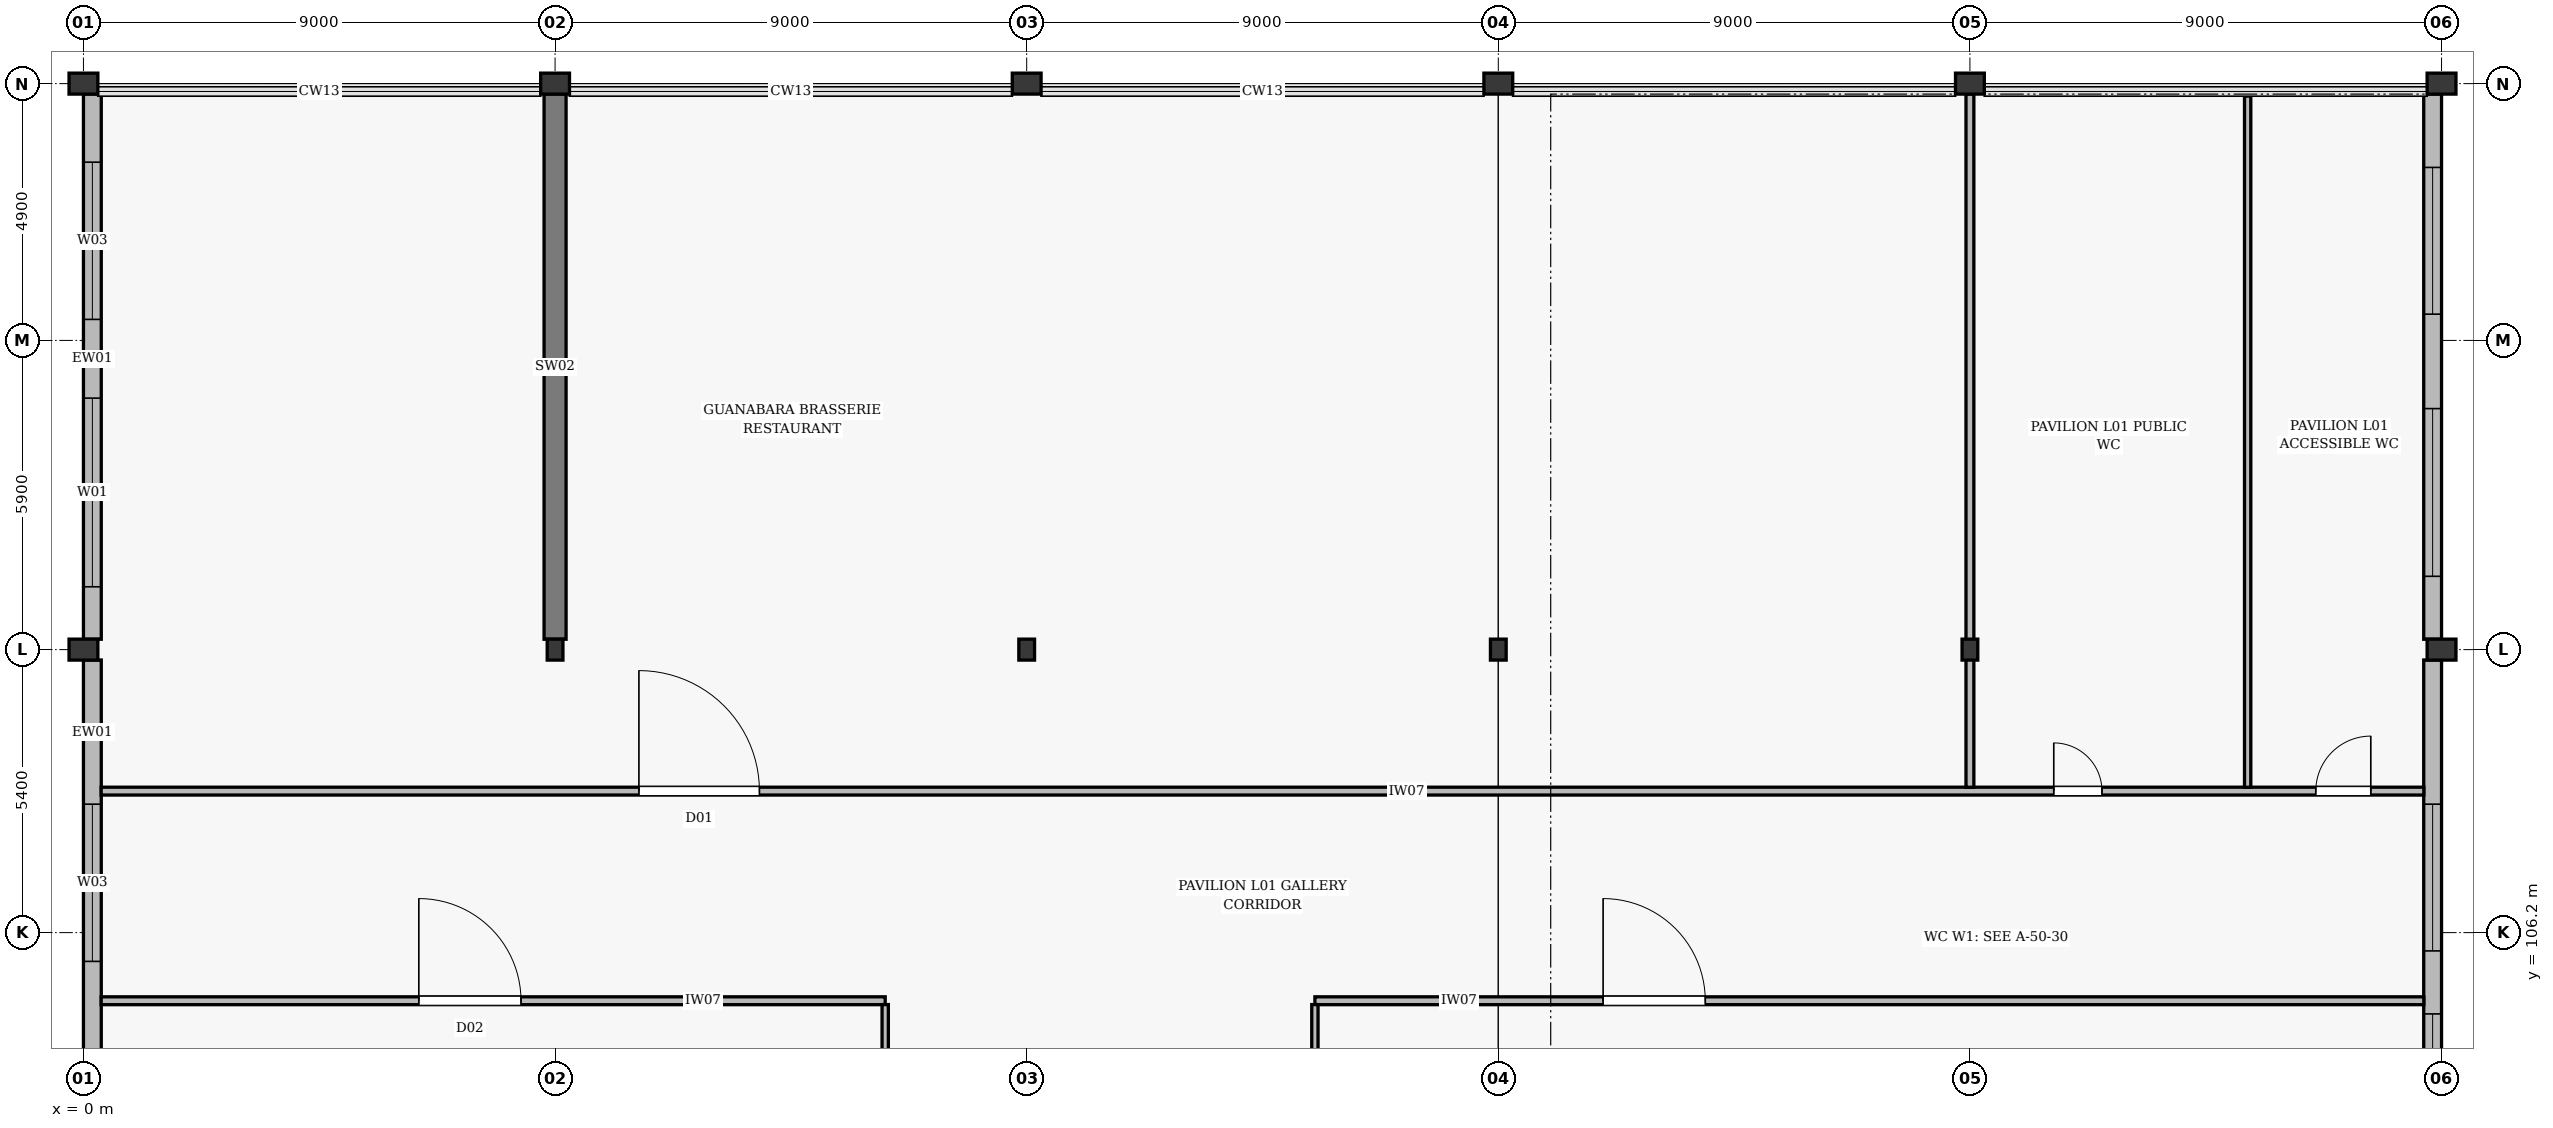
"""IFC4 building model, lengths in metres.
Left out: names, types, materials, properties, quantities, classifications, styles, units other than length and angle.
Written with IfcOpenShell. Run it as: python <this file> out.ifc"""

import sys

from ifc_helpers import new_model, si_unit, direction, frame, frame_2d, origin, origin_2d, place, context, subcontext, project, spatial, rectangle, i_section, extrude, element, fill, save


model = new_model("IFC4")
c1 = context("Model", 3, precision=1e-05, world=origin(), true_north=direction((0.0, 1.0)))
c2 = subcontext(c1, "Body", "Model", "MODEL_VIEW")
j1 = project(units=[si_unit("LENGTHUNIT", "METRE"), si_unit("PLANEANGLEUNIT", "RADIAN")], contexts=[c1])
p1 = place(None, origin())
s1 = spatial("IfcSite", under=j1, at=p1, CompositionType="ELEMENT")
p2 = place(p1, origin())
s2 = spatial("IfcBuilding", under=s1, at=p2, CompositionType="ELEMENT")
p3 = place(p2, frame((0.0, 0.0, 6.6)))
s3 = spatial("IfcBuildingStorey", under=s2, at=p3, CompositionType="ELEMENT", Elevation=6.6)
for number, where, z_axis, x_axis in (
    (1, (0.0, 111.6, 0.0), (0.0, 0.0, 1.0), (1.0, 0.0, 0.0)),
    (2, (0.0, 122.4, 0.0), (0.0, 0.0, 1.0), (1.0, 0.0, 0.0)),
):
    element("IfcColumn", number, at=place(p3, frame(where, z_axis=z_axis, x_axis=x_axis)), inside=s3, PredefinedType="PILASTER", context=c2, shape_type="SweptSolid", body=[
        extrude(rectangle(XDim=0.55, YDim=0.4, at=origin_2d()), origin(), (0.0, 0.0, 1.0), 6.0),
    ])
p4 = place(p3, frame((9.0, 111.6, 0.0), z_axis=(0.0, 0.0, 1.0), x_axis=(1.0, 0.0, 0.0)))
e3 = element("IfcColumn", 3, at=p4, inside=s3, PredefinedType="COLUMN", context=c2, shape_type="SweptSolid", body=[
    extrude(i_section(OverallWidth=0.3, OverallDepth=0.4, WebThickness=0.013, FlangeThickness=0.024, at=origin_2d()), origin(), (0.0, 0.0, 1.0), 6.0),
])
p5 = place(p3, frame((9.0, 122.4, 0.0), z_axis=(0.0, 0.0, 1.0), x_axis=(1.0, 0.0, 0.0)))
e4 = element("IfcColumn", 4, at=p5, inside=s3, PredefinedType="PILASTER", context=c2, shape_type="SweptSolid", body=[
    extrude(rectangle(XDim=0.55, YDim=0.4, at=origin_2d()), origin(), (0.0, 0.0, 1.0), 6.0),
])
p6 = place(p3, frame((18.0, 111.6, 0.0), z_axis=(0.0, 0.0, 1.0), x_axis=(1.0, 0.0, 0.0)))
e5 = element("IfcColumn", 5, at=p6, inside=s3, PredefinedType="COLUMN", context=c2, shape_type="SweptSolid", body=[
    extrude(i_section(OverallWidth=0.3, OverallDepth=0.4, WebThickness=0.013, FlangeThickness=0.024, at=origin_2d()), origin(), (0.0, 0.0, 1.0), 6.0),
])
p7 = place(p3, frame((18.0, 122.4, 0.0), z_axis=(0.0, 0.0, 1.0), x_axis=(1.0, 0.0, 0.0)))
e6 = element("IfcColumn", 6, at=p7, inside=s3, PredefinedType="PILASTER", context=c2, shape_type="SweptSolid", body=[
    extrude(rectangle(XDim=0.55, YDim=0.4, at=origin_2d()), origin(), (0.0, 0.0, 1.0), 6.0),
])
p8 = place(p3, frame((27.0, 111.6, 0.0), z_axis=(0.0, 0.0, 1.0), x_axis=(1.0, 0.0, 0.0)))
e7 = element("IfcColumn", 7, at=p8, inside=s3, PredefinedType="COLUMN", context=c2, shape_type="SweptSolid", body=[
    extrude(i_section(OverallWidth=0.3, OverallDepth=0.4, WebThickness=0.013, FlangeThickness=0.024, at=origin_2d()), origin(), (0.0, 0.0, 1.0), 6.0),
])
p9 = place(p3, frame((27.0, 122.4, 0.0), z_axis=(0.0, 0.0, 1.0), x_axis=(1.0, 0.0, 0.0)))
e8 = element("IfcColumn", 8, at=p9, inside=s3, PredefinedType="PILASTER", context=c2, shape_type="SweptSolid", body=[
    extrude(rectangle(XDim=0.55, YDim=0.4, at=origin_2d()), origin(), (0.0, 0.0, 1.0), 6.0),
])
p10 = place(p3, frame((36.0, 111.6, 0.0), z_axis=(0.0, 0.0, 1.0), x_axis=(1.0, 0.0, 0.0)))
e9 = element("IfcColumn", 9, at=p10, inside=s3, PredefinedType="COLUMN", context=c2, shape_type="SweptSolid", body=[
    extrude(i_section(OverallWidth=0.3, OverallDepth=0.4, WebThickness=0.013, FlangeThickness=0.024, at=origin_2d()), origin(), (0.0, 0.0, 1.0), 6.0),
])
for number, where, z_axis, x_axis in (
    (10, (36.0, 122.4, 0.0), (0.0, 0.0, 1.0), (1.0, 0.0, 0.0)),
    (11, (45.0, 111.6, 0.0), (0.0, 0.0, 1.0), (1.0, 0.0, 0.0)),
    (12, (45.0, 122.4, 0.0), (0.0, 0.0, 1.0), (1.0, 0.0, 0.0)),
):
    element("IfcColumn", number, at=place(p3, frame(where, z_axis=z_axis, x_axis=x_axis)), inside=s3, PredefinedType="PILASTER", context=c2, shape_type="SweptSolid", body=[
        extrude(rectangle(XDim=0.55, YDim=0.4, at=origin_2d()), origin(), (0.0, 0.0, 1.0), 6.0),
    ])
p11 = place(p3, frame((9.0, 111.798, 0.0), z_axis=(0.0, 0.0, 1.0), x_axis=(0.0, 1.0, 0.0)))
e13 = element("IfcWall", 13, at=p11, inside=s3, PredefinedType="SHEAR", context=c2, shape_type="SweptSolid", body=[
    extrude(rectangle(XDim=10.404, YDim=0.42, at=frame_2d((5.202, 0.0))), origin(), (0.0, 0.0, 1.0), 5.75),
])
p12 = place(p3, frame((0.17, 100.998, 0.0), z_axis=(0.0, 0.0, 1.0), x_axis=(0.0, 1.0, 0.0)))
e14 = element("IfcWall", 14, at=p12, inside=s3, PredefinedType="STANDARD", context=c2, shape_type="SweptSolid", body=[
    extrude(rectangle(XDim=10.404, YDim=0.34, at=frame_2d((5.202, 0.0))), origin(), (0.0, 0.0, 1.0), 5.25),
])
p13 = place(p12, frame((1.001, 0.0, 0.75)))
e15 = element("IfcOpeningElement", 15, at=p13, cuts=e14, PredefinedType="OPENING", context=c2, shape_type="SweptSolid", body=[
    extrude(rectangle(XDim=1.2, YDim=1.8, at=frame_2d((0.6, 0.9))), frame((0.0, 0.182, 0.0), z_axis=(0.0, -1.0, 0.0), x_axis=(1.0, 0.0, 0.0)), (0.0, 0.0, 1.0), 0.364),
])
p14 = place(p12, frame((4.653, 0.0, 0.75)))
e16 = element("IfcOpeningElement", 16, at=p14, cuts=e14, PredefinedType="OPENING", context=c2, shape_type="SweptSolid", body=[
    extrude(rectangle(XDim=3.0, YDim=2.6, at=frame_2d((1.5, 1.3))), frame((0.0, 0.182, 0.0), z_axis=(0.0, -1.0, 0.0), x_axis=(1.0, 0.0, 0.0)), (0.0, 0.0, 1.0), 0.364),
])
p15 = place(p3, frame((44.83, 100.998, 0.0), z_axis=(0.0, 0.0, 1.0), x_axis=(0.0, 1.0, 0.0)))
e17 = element("IfcWall", 17, at=p15, inside=s3, PredefinedType="STANDARD", context=c2, shape_type="SweptSolid", body=[
    extrude(rectangle(XDim=10.404, YDim=0.34, at=frame_2d((5.202, 0.0))), origin(), (0.0, 0.0, 1.0), 5.25),
])
p16 = place(p15, frame((0.451, 0.0, 0.75)))
e18 = element("IfcOpeningElement", 18, at=p16, cuts=e17, PredefinedType="OPENING", context=c2, shape_type="SweptSolid", body=[
    extrude(rectangle(XDim=3.2, YDim=2.8, at=frame_2d((1.6, 1.4))), frame((0.0, 0.182, 0.0), z_axis=(0.0, -1.0, 0.0), x_axis=(1.0, 0.0, 0.0)), (0.0, 0.0, 1.0), 0.364),
])
p17 = place(p15, frame((4.853, 0.0, 0.75)))
e19 = element("IfcOpeningElement", 19, at=p17, cuts=e17, PredefinedType="OPENING", context=c2, shape_type="SweptSolid", body=[
    extrude(rectangle(XDim=2.8, YDim=2.6, at=frame_2d((1.4, 1.3))), frame((0.0, 0.182, 0.0), z_axis=(0.0, -1.0, 0.0), x_axis=(1.0, 0.0, 0.0)), (0.0, 0.0, 1.0), 0.364),
])
p18 = place(p3, frame((0.17, 111.798, 0.0), z_axis=(0.0, 0.0, 1.0), x_axis=(0.0, 1.0, 0.0)))
e20 = element("IfcWall", 20, at=p18, inside=s3, PredefinedType="STANDARD", context=c2, shape_type="SweptSolid", body=[
    extrude(rectangle(XDim=10.404, YDim=0.34, at=frame_2d((5.202, 0.0))), origin(), (0.0, 0.0, 1.0), 5.25),
])
p19 = place(p18, frame((1.001, 0.0, 0.75)))
e21 = element("IfcOpeningElement", 21, at=p19, cuts=e20, PredefinedType="OPENING", context=c2, shape_type="SweptSolid", body=[
    extrude(rectangle(XDim=3.6, YDim=2.8, at=frame_2d((1.8, 1.4))), frame((0.0, 0.182, 0.0), z_axis=(0.0, -1.0, 0.0), x_axis=(1.0, 0.0, 0.0)), (0.0, 0.0, 1.0), 0.364),
])
p20 = place(p18, frame((6.103, 0.0, 0.75)))
e22 = element("IfcOpeningElement", 22, at=p20, cuts=e20, PredefinedType="OPENING", context=c2, shape_type="SweptSolid", body=[
    extrude(rectangle(XDim=3.0, YDim=2.6, at=frame_2d((1.5, 1.3))), frame((0.0, 0.182, 0.0), z_axis=(0.0, -1.0, 0.0), x_axis=(1.0, 0.0, 0.0)), (0.0, 0.0, 1.0), 0.364),
])
p21 = place(p3, frame((44.83, 111.798, 0.0), z_axis=(0.0, 0.0, 1.0), x_axis=(0.0, 1.0, 0.0)))
e23 = element("IfcWall", 23, at=p21, inside=s3, PredefinedType="STANDARD", context=c2, shape_type="SweptSolid", body=[
    extrude(rectangle(XDim=10.404, YDim=0.34, at=frame_2d((5.202, 0.0))), origin(), (0.0, 0.0, 1.0), 5.25),
])
p22 = place(p21, frame((1.201, 0.0, 0.75)))
e24 = element("IfcOpeningElement", 24, at=p22, cuts=e23, PredefinedType="OPENING", context=c2, shape_type="SweptSolid", body=[
    extrude(rectangle(XDim=3.2, YDim=2.8, at=frame_2d((1.6, 1.4))), frame((0.0, 0.182, 0.0), z_axis=(0.0, -1.0, 0.0), x_axis=(1.0, 0.0, 0.0)), (0.0, 0.0, 1.0), 0.364),
])
p23 = place(p21, frame((6.203, 0.0, 0.75)))
e25 = element("IfcOpeningElement", 25, at=p23, cuts=e23, PredefinedType="OPENING", context=c2, shape_type="SweptSolid", body=[
    extrude(rectangle(XDim=2.8, YDim=2.6, at=frame_2d((1.4, 1.3))), frame((0.0, 0.182, 0.0), z_axis=(0.0, -1.0, 0.0), x_axis=(1.0, 0.0, 0.0)), (0.0, 0.0, 1.0), 0.364),
])
p24 = place(p3, frame((0.338, 104.9, 0.0), z_axis=(0.0, 0.0, 1.0), x_axis=(1.0, 0.0, 0.0)))
e26 = element("IfcWall", 26, at=p24, inside=s3, PredefinedType="PARTITIONING", context=c2, shape_type="SweptSolid", body=[
    extrude(rectangle(XDim=14.962, YDim=0.15, at=frame_2d((7.481, 0.0))), origin(), (0.0, 0.0, 1.0), 5.29),
])
p25 = place(p24, frame((6.062, 0.0, 0.005)))
e27 = element("IfcOpeningElement", 27, at=p25, cuts=e26, PredefinedType="OPENING", context=c2, shape_type="SweptSolid", body=[
    extrude(rectangle(XDim=1.95, YDim=2.3, at=frame_2d((0.975, 1.15))), frame((0.0, 0.087, 0.0), z_axis=(0.0, -1.0, 0.0), x_axis=(1.0, 0.0, 0.0)), (0.0, 0.0, 1.0), 0.174),
])
p26 = place(p3, frame((23.5, 104.9, 0.0), z_axis=(0.0, 0.0, 1.0), x_axis=(1.0, 0.0, 0.0)))
e28 = element("IfcWall", 28, at=p26, inside=s3, PredefinedType="PARTITIONING", context=c2, shape_type="SweptSolid", body=[
    extrude(rectangle(XDim=21.162, YDim=0.15, at=frame_2d((10.581, 0.0))), origin(), (0.0, 0.0, 1.0), 5.29),
])
p27 = place(p26, frame((5.5, 0.0, 0.005)))
e29 = element("IfcOpeningElement", 29, at=p27, cuts=e28, PredefinedType="OPENING", context=c2, shape_type="SweptSolid", body=[
    extrude(rectangle(XDim=1.95, YDim=2.3, at=frame_2d((0.975, 1.15))), frame((0.0, 0.087, 0.0), z_axis=(0.0, -1.0, 0.0), x_axis=(1.0, 0.0, 0.0)), (0.0, 0.0, 1.0), 0.174),
])
p28 = place(p3, frame((0.338, 108.9, 0.0), z_axis=(0.0, 0.0, 1.0), x_axis=(1.0, 0.0, 0.0)))
e30 = element("IfcWall", 30, at=p28, inside=s3, PredefinedType="PARTITIONING", context=c2, shape_type="SweptSolid", body=[
    extrude(rectangle(XDim=44.324, YDim=0.15, at=frame_2d((22.162, 0.0))), origin(), (0.0, 0.0, 1.0), 5.29),
])
p29 = place(p28, frame((10.262, 0.0, 0.005)))
e31 = element("IfcOpeningElement", 31, at=p29, cuts=e30, PredefinedType="OPENING", context=c2, shape_type="SweptSolid", body=[
    extrude(rectangle(XDim=2.3, YDim=2.4, at=frame_2d((1.15, 1.2))), frame((0.0, 0.087, 0.0), z_axis=(0.0, -1.0, 0.0), x_axis=(1.0, 0.0, 0.0)), (0.0, 0.0, 1.0), 0.174),
])
p30 = place(p28, frame((37.262, 0.0, 0.005)))
e32 = element("IfcOpeningElement", 32, at=p30, cuts=e30, PredefinedType="OPENING", context=c2, shape_type="SweptSolid", body=[
    extrude(rectangle(XDim=0.92, YDim=2.12, at=frame_2d((0.46, 1.06))), frame((0.0, 0.087, 0.0), z_axis=(0.0, -1.0, 0.0), x_axis=(1.0, 0.0, 0.0)), (0.0, 0.0, 1.0), 0.174),
])
p31 = place(p28, frame((42.262, 0.0, 0.005)))
e33 = element("IfcOpeningElement", 33, at=p31, cuts=e30, PredefinedType="OPENING", context=c2, shape_type="SweptSolid", body=[
    extrude(rectangle(XDim=1.05, YDim=2.15, at=frame_2d((0.525, 1.075))), frame((0.0, 0.087, 0.0), z_axis=(0.0, -1.0, 0.0), x_axis=(1.0, 0.0, 0.0)), (0.0, 0.0, 1.0), 0.174),
])
for number, where, z_axis, x_axis in (
    (34, (15.3, 90.238, 0.0), (0.0, 0.0, 1.0), (0.0, 1.0, 0.0)),
    (35, (23.5, 90.238, 0.0), (0.0, 0.0, 1.0), (0.0, 1.0, 0.0)),
):
    element("IfcWall", number, at=place(p3, frame(where, z_axis=z_axis, x_axis=x_axis)), inside=s3, PredefinedType="PARTITIONING", context=c2, shape_type="SweptSolid", body=[
        extrude(rectangle(XDim=14.589, YDim=0.12, at=frame_2d((7.294, 0.0))), origin(), (0.0, 0.0, 1.0), 5.24),
    ])
p32 = place(p3, frame((36.0, 108.973, 0.0), z_axis=(0.0, 0.0, 1.0), x_axis=(0.0, 1.0, 0.0)))
e36 = element("IfcWall", 36, at=p32, inside=s3, PredefinedType="PARTITIONING", context=c2, shape_type="SweptSolid", body=[
    extrude(rectangle(XDim=13.229, YDim=0.15, at=frame_2d((6.615, 0.0))), origin(), (0.0, 0.0, 1.0), 5.24),
])
p33 = place(p3, frame((41.3, 108.973, 0.0), z_axis=(0.0, 0.0, 1.0), x_axis=(0.0, 1.0, 0.0)))
e37 = element("IfcWall", 37, at=p33, inside=s3, PredefinedType="PARTITIONING", context=c2, shape_type="SweptSolid", body=[
    extrude(rectangle(XDim=13.189, YDim=0.12, at=frame_2d((6.595, 0.0))), origin(), (0.0, 0.0, 1.0), 5.33),
])
p34 = place(p14, origin())
e38 = element("IfcWindow", 38, at=p34, inside=s3, PartitioningType="DOUBLE_PANEL_VERTICAL", PredefinedType="WINDOW", context=c2, shape_type="SweptSolid", body=[
    extrude(rectangle(XDim=3.0, YDim=2.6, at=frame_2d((1.5, 1.3))), frame((0.0, 0.03, 0.0), z_axis=(0.0, -1.0, 0.0), x_axis=(1.0, 0.0, 0.0)), (0.0, 0.0, 1.0), 0.06),
])
fill(e16, e38)
p35 = place(p16, origin())
e39 = element("IfcWindow", 39, at=p35, inside=s3, PartitioningType="DOUBLE_PANEL_VERTICAL", PredefinedType="WINDOW", context=c2, shape_type="SweptSolid", body=[
    extrude(rectangle(XDim=3.2, YDim=2.8, at=frame_2d((1.6, 1.4))), frame((0.0, 0.03, 0.0), z_axis=(0.0, -1.0, 0.0), x_axis=(1.0, 0.0, 0.0)), (0.0, 0.0, 1.0), 0.06),
])
fill(e18, e39)
p36 = place(p17, origin())
e40 = element("IfcWindow", 40, at=p36, inside=s3, PartitioningType="DOUBLE_PANEL_VERTICAL", PredefinedType="WINDOW", context=c2, shape_type="SweptSolid", body=[
    extrude(rectangle(XDim=2.8, YDim=2.6, at=frame_2d((1.4, 1.3))), frame((0.0, 0.03, 0.0), z_axis=(0.0, -1.0, 0.0), x_axis=(1.0, 0.0, 0.0)), (0.0, 0.0, 1.0), 0.06),
])
fill(e19, e40)
p37 = place(p19, origin())
e41 = element("IfcWindow", 41, at=p37, inside=s3, PartitioningType="DOUBLE_PANEL_VERTICAL", PredefinedType="WINDOW", context=c2, shape_type="SweptSolid", body=[
    extrude(rectangle(XDim=3.6, YDim=2.8, at=frame_2d((1.8, 1.4))), frame((0.0, 0.03, 0.0), z_axis=(0.0, -1.0, 0.0), x_axis=(1.0, 0.0, 0.0)), (0.0, 0.0, 1.0), 0.06),
])
fill(e21, e41)
p38 = place(p20, origin())
e42 = element("IfcWindow", 42, at=p38, inside=s3, PartitioningType="DOUBLE_PANEL_VERTICAL", PredefinedType="WINDOW", context=c2, shape_type="SweptSolid", body=[
    extrude(rectangle(XDim=3.0, YDim=2.6, at=frame_2d((1.5, 1.3))), frame((0.0, 0.03, 0.0), z_axis=(0.0, -1.0, 0.0), x_axis=(1.0, 0.0, 0.0)), (0.0, 0.0, 1.0), 0.06),
])
fill(e22, e42)
p39 = place(p22, origin())
e43 = element("IfcWindow", 43, at=p39, inside=s3, PartitioningType="DOUBLE_PANEL_VERTICAL", PredefinedType="WINDOW", context=c2, shape_type="SweptSolid", body=[
    extrude(rectangle(XDim=3.2, YDim=2.8, at=frame_2d((1.6, 1.4))), frame((0.0, 0.03, 0.0), z_axis=(0.0, -1.0, 0.0), x_axis=(1.0, 0.0, 0.0)), (0.0, 0.0, 1.0), 0.06),
])
fill(e24, e43)
p40 = place(p23, origin())
e44 = element("IfcWindow", 44, at=p40, inside=s3, PartitioningType="DOUBLE_PANEL_VERTICAL", PredefinedType="WINDOW", context=c2, shape_type="SweptSolid", body=[
    extrude(rectangle(XDim=2.8, YDim=2.6, at=frame_2d((1.4, 1.3))), frame((0.0, 0.03, 0.0), z_axis=(0.0, -1.0, 0.0), x_axis=(1.0, 0.0, 0.0)), (0.0, 0.0, 1.0), 0.06),
])
fill(e25, e44)
p41 = place(p25, origin())
e45 = element("IfcDoor", 45, at=p41, inside=s3, OperationType="DOUBLE_DOOR_SINGLE_SWING", PredefinedType="DOOR", context=c2, shape_type="SweptSolid", body=[
    extrude(rectangle(XDim=1.95, YDim=2.3, at=frame_2d((0.975, 1.15))), frame((0.0, 0.025, 0.0), z_axis=(0.0, -1.0, 0.0), x_axis=(1.0, 0.0, 0.0)), (0.0, 0.0, 1.0), 0.05),
])
fill(e27, e45)
p42 = place(p27, origin())
e46 = element("IfcDoor", 46, at=p42, inside=s3, OperationType="DOUBLE_DOOR_SINGLE_SWING", PredefinedType="DOOR", context=c2, shape_type="SweptSolid", body=[
    extrude(rectangle(XDim=1.95, YDim=2.3, at=frame_2d((0.975, 1.15))), frame((0.0, 0.025, 0.0), z_axis=(0.0, -1.0, 0.0), x_axis=(1.0, 0.0, 0.0)), (0.0, 0.0, 1.0), 0.05),
])
fill(e29, e46)
p43 = place(p29, origin())
e47 = element("IfcDoor", 47, at=p43, inside=s3, OperationType="DOUBLE_DOOR_SINGLE_SWING", PredefinedType="DOOR", context=c2, shape_type="SweptSolid", body=[
    extrude(rectangle(XDim=2.3, YDim=2.4, at=frame_2d((1.15, 1.2))), frame((0.0, 0.025, 0.0), z_axis=(0.0, -1.0, 0.0), x_axis=(1.0, 0.0, 0.0)), (0.0, 0.0, 1.0), 0.05),
])
fill(e31, e47)
p44 = place(p30, origin())
e48 = element("IfcDoor", 48, at=p44, inside=s3, OperationType="SINGLE_SWING_LEFT", PredefinedType="DOOR", context=c2, shape_type="SweptSolid", body=[
    extrude(rectangle(XDim=0.92, YDim=2.12, at=frame_2d((0.46, 1.06))), frame((0.0, 0.025, 0.0), z_axis=(0.0, -1.0, 0.0), x_axis=(1.0, 0.0, 0.0)), (0.0, 0.0, 1.0), 0.05),
])
fill(e32, e48)
p45 = place(p31, origin())
e49 = element("IfcDoor", 49, at=p45, inside=s3, OperationType="SINGLE_SWING_RIGHT", PredefinedType="DOOR", context=c2, shape_type="SweptSolid", body=[
    extrude(rectangle(XDim=1.05, YDim=2.15, at=frame_2d((0.525, 1.075))), frame((0.0, 0.025, 0.0), z_axis=(0.0, -1.0, 0.0), x_axis=(1.0, 0.0, 0.0)), (0.0, 0.0, 1.0), 0.05),
])
fill(e33, e49)
save(model, sys.argv[1])
